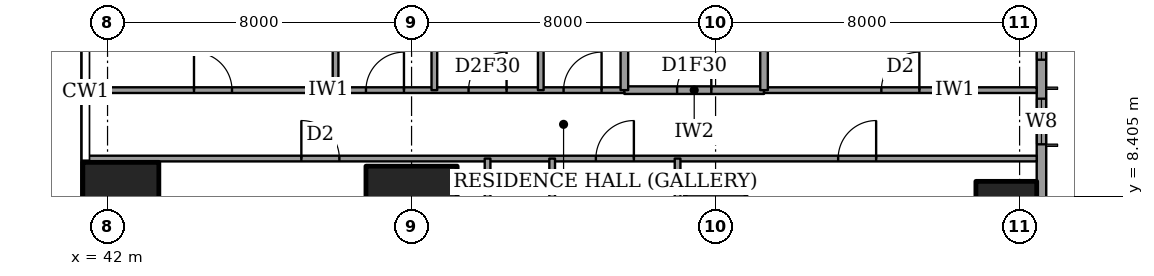
"""IFC4 building model, lengths in metres.
Left out: names, types, materials, properties, quantities, classifications, styles, units other than length and angle.
Written with IfcOpenShell. Run it as: python <this file> out.ifc"""

import sys

from ifc_helpers import new_model, si_unit, direction, frame, frame_2d, origin, origin_2d, place, context, subcontext, project, spatial, rectangle, extrude, element, fill, save


model = new_model("IFC4")
c1 = context("Model", 3, precision=1e-05, world=origin(), true_north=direction((0.0, 1.0)))
c2 = subcontext(c1, "Body", "Model", "MODEL_VIEW")
j1 = project(units=[si_unit("LENGTHUNIT", "METRE"), si_unit("PLANEANGLEUNIT", "RADIAN")], contexts=[c1])
p1 = place(None, origin())
s1 = spatial("IfcSite", under=j1, at=p1, CompositionType="ELEMENT")
p2 = place(p1, origin())
s2 = spatial("IfcBuilding", under=s1, at=p2, CompositionType="ELEMENT")
p3 = place(p2, frame((0.0, 0.0, 259.2)))
s3 = spatial("IfcBuildingStorey", under=s2, at=p3, CompositionType="ELEMENT", Elevation=259.2)
p4 = place(p3, frame((42.35, 8.0, 0.0), z_axis=(0.0, 0.0, 1.0), x_axis=(1.0, 0.0, 0.0)))
e1 = element("IfcColumn", 1, at=p4, inside=s3, PredefinedType="COLUMN", context=c2, shape_type="SweptSolid", body=[
    extrude(rectangle(XDim=2.0, YDim=2.6, at=origin_2d()), origin(), (0.0, 0.0, 1.0), 3.6),
])
p5 = place(p3, frame((50.0, 8.0, 0.0), z_axis=(0.0, 0.0, 1.0), x_axis=(1.0, 0.0, 0.0)))
e2 = element("IfcColumn", 2, at=p5, inside=s3, PredefinedType="COLUMN", context=c2, shape_type="SweptSolid", body=[
    extrude(rectangle(XDim=2.4, YDim=2.4, at=origin_2d()), origin(), (0.0, 0.0, 1.0), 3.6),
])
for number, where, z_axis, x_axis in (
    (3, (58.0, 8.0, 0.0), (0.0, 0.0, 1.0), (1.0, 0.0, 0.0)),
    (4, (65.65, 8.0, 0.0), (0.0, 0.0, 1.0), (1.0, 0.0, 0.0)),
):
    element("IfcColumn", number, at=place(p3, frame(where, z_axis=z_axis, x_axis=x_axis)), inside=s3, PredefinedType="COLUMN", context=c2, shape_type="SweptSolid", body=[
        extrude(rectangle(XDim=1.6, YDim=1.6, at=origin_2d()), origin(), (0.0, 0.0, 1.0), 3.6),
    ])
p6 = place(p3, frame((66.575, 3.175, 0.0), z_axis=(0.0, 0.0, 1.0), x_axis=(0.0, 1.0, 0.0)))
e5 = element("IfcWall", 5, at=p6, inside=s3, PredefinedType="SOLIDWALL", context=c2, shape_type="SweptSolid", body=[
    extrude(rectangle(XDim=41.65, YDim=0.25, at=frame_2d((20.825, 0.0))), origin(), (0.0, 0.0, 1.0), 3.6),
])
p7 = place(p6, frame((0.875, 0.0, 0.6)))
e6 = element("IfcOpeningElement", 6, at=p7, cuts=e5, PredefinedType="OPENING", context=c2, shape_type="SweptSolid", body=[
    extrude(rectangle(XDim=2.4, YDim=2.0, at=frame_2d((1.2, 1.0))), frame((0.0, 0.135, 0.0), z_axis=(0.0, -1.0, 0.0), x_axis=(1.0, 0.0, 0.0)), (0.0, 0.0, 1.0), 0.27),
])
p8 = place(p6, frame((6.6, 0.0, 0.6)))
e7 = element("IfcOpeningElement", 7, at=p8, cuts=e5, PredefinedType="OPENING", context=c2, shape_type="SweptSolid", body=[
    extrude(rectangle(XDim=1.2, YDim=2.0, at=frame_2d((0.6, 1.0))), frame((0.0, 0.135, 0.0), z_axis=(0.0, -1.0, 0.0), x_axis=(1.0, 0.0, 0.0)), (0.0, 0.0, 1.0), 0.27),
])
p9 = place(p6, frame((8.825, 0.0, 0.6)))
e8 = element("IfcOpeningElement", 8, at=p9, cuts=e5, PredefinedType="OPENING", context=c2, shape_type="SweptSolid", body=[
    extrude(rectangle(XDim=2.4, YDim=2.0, at=frame_2d((1.2, 1.0))), frame((0.0, 0.135, 0.0), z_axis=(0.0, -1.0, 0.0), x_axis=(1.0, 0.0, 0.0)), (0.0, 0.0, 1.0), 0.27),
])
p10 = place(p6, frame((15.725, 0.0, 0.6)))
e9 = element("IfcOpeningElement", 9, at=p10, cuts=e5, PredefinedType="OPENING", context=c2, shape_type="SweptSolid", body=[
    extrude(rectangle(XDim=2.4, YDim=2.0, at=frame_2d((1.2, 1.0))), frame((0.0, 0.135, 0.0), z_axis=(0.0, -1.0, 0.0), x_axis=(1.0, 0.0, 0.0)), (0.0, 0.0, 1.0), 0.27),
])
p11 = place(p6, frame((23.625, 0.0, 0.6)))
e10 = element("IfcOpeningElement", 10, at=p11, cuts=e5, PredefinedType="OPENING", context=c2, shape_type="SweptSolid", body=[
    extrude(rectangle(XDim=2.4, YDim=2.0, at=frame_2d((1.2, 1.0))), frame((0.0, 0.135, 0.0), z_axis=(0.0, -1.0, 0.0), x_axis=(1.0, 0.0, 0.0)), (0.0, 0.0, 1.0), 0.27),
])
p12 = place(p6, frame((30.725, 0.0, 0.6)))
e11 = element("IfcOpeningElement", 11, at=p12, cuts=e5, PredefinedType="OPENING", context=c2, shape_type="SweptSolid", body=[
    extrude(rectangle(XDim=2.4, YDim=2.0, at=frame_2d((1.2, 1.0))), frame((0.0, 0.135, 0.0), z_axis=(0.0, -1.0, 0.0), x_axis=(1.0, 0.0, 0.0)), (0.0, 0.0, 1.0), 0.27),
])
p13 = place(p6, frame((34.525, 0.0, 0.6)))
e12 = element("IfcOpeningElement", 12, at=p13, cuts=e5, PredefinedType="OPENING", context=c2, shape_type="SweptSolid", body=[
    extrude(rectangle(XDim=1.2, YDim=2.0, at=frame_2d((0.6, 1.0))), frame((0.0, 0.135, 0.0), z_axis=(0.0, -1.0, 0.0), x_axis=(1.0, 0.0, 0.0)), (0.0, 0.0, 1.0), 0.27),
])
p14 = place(p6, frame((38.375, 0.0, 0.6)))
e13 = element("IfcOpeningElement", 13, at=p14, cuts=e5, PredefinedType="OPENING", context=c2, shape_type="SweptSolid", body=[
    extrude(rectangle(XDim=2.4, YDim=2.0, at=frame_2d((1.2, 1.0))), frame((0.0, 0.135, 0.0), z_axis=(0.0, -1.0, 0.0), x_axis=(1.0, 0.0, 0.0)), (0.0, 0.0, 1.0), 0.27),
])
p15 = place(p3, frame((41.439, 9.4, 0.0), z_axis=(0.0, 0.0, 1.0), x_axis=(1.0, 0.0, 0.0)))
e14 = element("IfcWall", 14, at=p15, inside=s3, PredefinedType="PARTITIONING", context=c2, shape_type="SweptSolid", body=[
    extrude(rectangle(XDim=25.011, YDim=0.15, at=frame_2d((12.505, 0.0))), origin(), (0.0, 0.0, 1.0), 3.35),
])
p16 = place(p15, frame((19.786, 0.0, 0.0)))
e15 = element("IfcOpeningElement", 15, at=p16, cuts=e14, PredefinedType="OPENING", context=c2, shape_type="SweptSolid", body=[
    extrude(rectangle(XDim=1.0, YDim=2.1, at=frame_2d((0.5, 1.05))), frame((0.0, 0.085, 0.0), z_axis=(0.0, -1.0, 0.0), x_axis=(1.0, 0.0, 0.0)), (0.0, 0.0, 1.0), 0.17),
])
p17 = place(p15, frame((13.411, 0.0, 0.0)))
e16 = element("IfcOpeningElement", 16, at=p17, cuts=e14, PredefinedType="OPENING", context=c2, shape_type="SweptSolid", body=[
    extrude(rectangle(XDim=1.0, YDim=2.1, at=frame_2d((0.5, 1.05))), frame((0.0, 0.085, 0.0), z_axis=(0.0, -1.0, 0.0), x_axis=(1.0, 0.0, 0.0)), (0.0, 0.0, 1.0), 0.17),
])
p18 = place(p15, frame((5.661, 0.0, 0.0)))
e17 = element("IfcOpeningElement", 17, at=p18, cuts=e14, PredefinedType="OPENING", context=c2, shape_type="SweptSolid", body=[
    extrude(rectangle(XDim=1.0, YDim=2.1, at=frame_2d((0.5, 1.05))), frame((0.0, 0.085, 0.0), z_axis=(0.0, -1.0, 0.0), x_axis=(1.0, 0.0, 0.0)), (0.0, 0.0, 1.0), 0.17),
])
p19 = place(p3, frame((55.6, 11.2, 0.0), z_axis=(0.0, 0.0, 1.0), x_axis=(1.0, 0.0, 0.0)))
e18 = element("IfcWall", 18, at=p19, inside=s3, PredefinedType="PARTITIONING", context=c2, shape_type="SweptSolid", body=[
    extrude(rectangle(XDim=3.675, YDim=0.2, at=frame_2d((1.837, 0.0))), origin(), (0.0, 0.0, 1.0), 3.35),
])
p20 = place(p19, frame((1.387, 0.0, 0.0)))
e19 = element("IfcOpeningElement", 19, at=p20, cuts=e18, PredefinedType="OPENING", context=c2, shape_type="SweptSolid", body=[
    extrude(rectangle(XDim=0.9, YDim=2.1, at=frame_2d((0.45, 1.05))), frame((0.0, 0.11, 0.0), z_axis=(0.0, -1.0, 0.0), x_axis=(1.0, 0.0, 0.0)), (0.0, 0.0, 1.0), 0.22),
])
p21 = place(p3, frame((41.439, 11.2, 0.0), z_axis=(0.0, 0.0, 1.0), x_axis=(1.0, 0.0, 0.0)))
e20 = element("IfcWall", 20, at=p21, inside=s3, PredefinedType="PARTITIONING", context=c2, shape_type="SweptSolid", body=[
    extrude(rectangle(XDim=14.161, YDim=0.15, at=frame_2d((7.081, 0.0))), origin(), (0.0, 0.0, 1.0), 3.35),
])
p22 = place(p21, frame((12.561, 0.0, 0.0)))
e21 = element("IfcOpeningElement", 21, at=p22, cuts=e20, PredefinedType="OPENING", context=c2, shape_type="SweptSolid", body=[
    extrude(rectangle(XDim=1.0, YDim=2.1, at=frame_2d((0.5, 1.05))), frame((0.0, 0.085, 0.0), z_axis=(0.0, -1.0, 0.0), x_axis=(1.0, 0.0, 0.0)), (0.0, 0.0, 1.0), 0.17),
])
p23 = place(p21, frame((10.061, 0.0, 0.0)))
e22 = element("IfcOpeningElement", 22, at=p23, cuts=e20, PredefinedType="OPENING", context=c2, shape_type="SweptSolid", body=[
    extrude(rectangle(XDim=1.0, YDim=2.1, at=frame_2d((0.5, 1.05))), frame((0.0, 0.085, 0.0), z_axis=(0.0, -1.0, 0.0), x_axis=(1.0, 0.0, 0.0)), (0.0, 0.0, 1.0), 0.17),
])
p24 = place(p21, frame((7.361, 0.0, 0.0)))
e23 = element("IfcOpeningElement", 23, at=p24, cuts=e20, PredefinedType="OPENING", context=c2, shape_type="SweptSolid", body=[
    extrude(rectangle(XDim=1.0, YDim=2.1, at=frame_2d((0.5, 1.05))), frame((0.0, 0.085, 0.0), z_axis=(0.0, -1.0, 0.0), x_axis=(1.0, 0.0, 0.0)), (0.0, 0.0, 1.0), 0.17),
])
p25 = place(p21, frame((2.836, 0.0, 0.0)))
e24 = element("IfcOpeningElement", 24, at=p25, cuts=e20, PredefinedType="OPENING", context=c2, shape_type="SweptSolid", body=[
    extrude(rectangle(XDim=1.0, YDim=2.1, at=frame_2d((0.5, 1.05))), frame((0.0, 0.085, 0.0), z_axis=(0.0, -1.0, 0.0), x_axis=(1.0, 0.0, 0.0)), (0.0, 0.0, 1.0), 0.17),
])
p26 = place(p3, frame((59.275, 11.2, 0.0), z_axis=(0.0, 0.0, 1.0), x_axis=(1.0, 0.0, 0.0)))
e25 = element("IfcWall", 25, at=p26, inside=s3, PredefinedType="PARTITIONING", context=c2, shape_type="SweptSolid", body=[
    extrude(rectangle(XDim=7.175, YDim=0.15, at=frame_2d((3.587, 0.0))), origin(), (0.0, 0.0, 1.0), 3.35),
])
p27 = place(p26, frame((3.087, 0.0, 0.0)))
e26 = element("IfcOpeningElement", 26, at=p27, cuts=e25, PredefinedType="OPENING", context=c2, shape_type="SweptSolid", body=[
    extrude(rectangle(XDim=1.0, YDim=2.1, at=frame_2d((0.5, 1.05))), frame((0.0, 0.085, 0.0), z_axis=(0.0, -1.0, 0.0), x_axis=(1.0, 0.0, 0.0)), (0.0, 0.0, 1.0), 0.17),
])
p28 = place(p3, frame((48.0, 11.2, 0.0), z_axis=(0.0, 0.0, 1.0), x_axis=(0.0, 1.0, 0.0)))
e27 = element("IfcWall", 27, at=p28, inside=s3, PredefinedType="PARTITIONING", context=c2, shape_type="SweptSolid", body=[
    extrude(rectangle(XDim=6.8, YDim=0.15, at=frame_2d((3.4, 0.0))), origin(), (0.0, 0.0, 1.0), 3.35),
])
p29 = place(p3, frame((50.6, 11.2, 0.0), z_axis=(0.0, 0.0, 1.0), x_axis=(0.0, 1.0, 0.0)))
e28 = element("IfcWall", 28, at=p29, inside=s3, PredefinedType="PARTITIONING", context=c2, shape_type="SweptSolid", body=[
    extrude(rectangle(XDim=3.6, YDim=0.15, at=frame_2d((1.8, 0.0))), origin(), (0.0, 0.0, 1.0), 3.35),
])
p30 = place(p3, frame((52.0, -0.45, 0.0), z_axis=(0.0, 0.0, 1.0), x_axis=(0.0, 1.0, 0.0)))
e29 = element("IfcWall", 29, at=p30, inside=s3, PredefinedType="PARTITIONING", context=c2, shape_type="SweptSolid", body=[
    extrude(rectangle(XDim=9.85, YDim=0.15, at=frame_2d((4.925, 0.0))), origin(), (0.0, 0.0, 1.0), 3.35),
])
p31 = place(p3, frame((53.4, 11.2, 0.0), z_axis=(0.0, 0.0, 1.0), x_axis=(0.0, 1.0, 0.0)))
e30 = element("IfcWall", 30, at=p31, inside=s3, PredefinedType="PARTITIONING", context=c2, shape_type="SweptSolid", body=[
    extrude(rectangle(XDim=6.8, YDim=0.15, at=frame_2d((3.4, 0.0))), origin(), (0.0, 0.0, 1.0), 3.35),
])
p32 = place(p3, frame((53.7, -0.45, 0.0), z_axis=(0.0, 0.0, 1.0), x_axis=(0.0, 1.0, 0.0)))
e31 = element("IfcWall", 31, at=p32, inside=s3, PredefinedType="PARTITIONING", context=c2, shape_type="SweptSolid", body=[
    extrude(rectangle(XDim=9.85, YDim=0.15, at=frame_2d((4.925, 0.0))), origin(), (0.0, 0.0, 1.0), 3.35),
])
p33 = place(p32, frame((4.475, 0.0, 0.0)))
e32 = element("IfcOpeningElement", 32, at=p33, cuts=e31, PredefinedType="OPENING", context=c2, shape_type="SweptSolid", body=[
    extrude(rectangle(XDim=0.9, YDim=2.1, at=frame_2d((0.45, 1.05))), frame((0.0, 0.085, 0.0), z_axis=(0.0, -1.0, 0.0), x_axis=(1.0, 0.0, 0.0)), (0.0, 0.0, 1.0), 0.17),
])
p34 = place(p3, frame((55.6, 11.2, 0.0), z_axis=(0.0, 0.0, 1.0), x_axis=(0.0, 1.0, 0.0)))
e33 = element("IfcWall", 33, at=p34, inside=s3, PredefinedType="PARTITIONING", context=c2, shape_type="SweptSolid", body=[
    extrude(rectangle(XDim=3.4, YDim=0.2, at=frame_2d((1.7, 0.0))), origin(), (0.0, 0.0, 1.0), 3.35),
])
p35 = place(p3, frame((57.0, -0.45, 0.0), z_axis=(0.0, 0.0, 1.0), x_axis=(0.0, 1.0, 0.0)))
e34 = element("IfcWall", 34, at=p35, inside=s3, PredefinedType="PARTITIONING", context=c2, shape_type="SweptSolid", body=[
    extrude(rectangle(XDim=9.85, YDim=0.15, at=frame_2d((4.925, 0.0))), origin(), (0.0, 0.0, 1.0), 3.35),
])
p36 = place(p3, frame((59.275, 11.2, 0.0), z_axis=(0.0, 0.0, 1.0), x_axis=(0.0, 1.0, 0.0)))
e35 = element("IfcWall", 35, at=p36, inside=s3, PredefinedType="PARTITIONING", context=c2, shape_type="SweptSolid", body=[
    extrude(rectangle(XDim=3.4, YDim=0.2, at=frame_2d((1.7, 0.0))), origin(), (0.0, 0.0, 1.0), 3.35),
])
p37 = place(p8, origin())
e36 = element("IfcWindow", 36, at=p37, inside=s3, PartitioningType="SINGLE_PANEL", PredefinedType="WINDOW", context=c2, shape_type="SweptSolid", body=[
    extrude(rectangle(XDim=1.2, YDim=2.0, at=frame_2d((0.6, 1.0))), frame((0.0, 0.03, 0.0), z_axis=(0.0, -1.0, 0.0), x_axis=(1.0, 0.0, 0.0)), (0.0, 0.0, 1.0), 0.06),
])
fill(e7, e36)
p38 = place(p9, origin())
e37 = element("IfcWindow", 37, at=p38, inside=s3, PartitioningType="SINGLE_PANEL", PredefinedType="WINDOW", context=c2, shape_type="SweptSolid", body=[
    extrude(rectangle(XDim=2.4, YDim=2.0, at=frame_2d((1.2, 1.0))), frame((0.0, 0.03, 0.0), z_axis=(0.0, -1.0, 0.0), x_axis=(1.0, 0.0, 0.0)), (0.0, 0.0, 1.0), 0.06),
])
fill(e8, e37)
p39 = place(p16, origin())
e38 = element("IfcDoor", 38, at=p39, inside=s3, OperationType="SINGLE_SWING_LEFT", PredefinedType="DOOR", context=c2, shape_type="SweptSolid", body=[
    extrude(rectangle(XDim=1.0, YDim=2.1, at=frame_2d((0.5, 1.05))), frame((0.0, 0.025, 0.0), z_axis=(0.0, -1.0, 0.0), x_axis=(1.0, 0.0, 0.0)), (0.0, 0.0, 1.0), 0.05),
])
fill(e15, e38)
p40 = place(p17, origin())
e39 = element("IfcDoor", 39, at=p40, inside=s3, OperationType="SINGLE_SWING_LEFT", PredefinedType="DOOR", context=c2, shape_type="SweptSolid", body=[
    extrude(rectangle(XDim=1.0, YDim=2.1, at=frame_2d((0.5, 1.05))), frame((0.0, 0.025, 0.0), z_axis=(0.0, -1.0, 0.0), x_axis=(1.0, 0.0, 0.0)), (0.0, 0.0, 1.0), 0.05),
])
fill(e16, e39)
p41 = place(p18, origin())
e40 = element("IfcDoor", 40, at=p41, inside=s3, OperationType="SINGLE_SWING_RIGHT", PredefinedType="DOOR", context=c2, shape_type="SweptSolid", body=[
    extrude(rectangle(XDim=1.0, YDim=2.1, at=frame_2d((0.5, 1.05))), frame((0.0, 0.025, 0.0), z_axis=(0.0, -1.0, 0.0), x_axis=(1.0, 0.0, 0.0)), (0.0, 0.0, 1.0), 0.05),
])
fill(e17, e40)
p42 = place(p22, origin())
e41 = element("IfcDoor", 41, at=p42, inside=s3, OperationType="SINGLE_SWING_LEFT", PredefinedType="DOOR", context=c2, shape_type="SweptSolid", body=[
    extrude(rectangle(XDim=1.0, YDim=2.1, at=frame_2d((0.5, 1.05))), frame((0.0, 0.025, 0.0), z_axis=(0.0, -1.0, 0.0), x_axis=(1.0, 0.0, 0.0)), (0.0, 0.0, 1.0), 0.05),
])
fill(e21, e41)
p43 = place(p27, origin())
e42 = element("IfcDoor", 42, at=p43, inside=s3, OperationType="SINGLE_SWING_LEFT", PredefinedType="DOOR", context=c2, shape_type="SweptSolid", body=[
    extrude(rectangle(XDim=1.0, YDim=2.1, at=frame_2d((0.5, 1.05))), frame((0.0, 0.025, 0.0), z_axis=(0.0, -1.0, 0.0), x_axis=(1.0, 0.0, 0.0)), (0.0, 0.0, 1.0), 0.05),
])
fill(e26, e42)
p44 = place(p20, origin())
e43 = element("IfcDoor", 43, at=p44, inside=s3, OperationType="SINGLE_SWING_LEFT", PredefinedType="DOOR", context=c2, shape_type="SweptSolid", body=[
    extrude(rectangle(XDim=0.9, YDim=2.1, at=frame_2d((0.45, 1.05))), frame((0.0, 0.025, 0.0), z_axis=(0.0, -1.0, 0.0), x_axis=(1.0, 0.0, 0.0)), (0.0, 0.0, 1.0), 0.05),
])
fill(e19, e43)
p45 = place(p23, origin())
e44 = element("IfcDoor", 44, at=p45, inside=s3, OperationType="SINGLE_SWING_LEFT", PredefinedType="DOOR", context=c2, shape_type="SweptSolid", body=[
    extrude(rectangle(XDim=1.0, YDim=2.1, at=frame_2d((0.5, 1.05))), frame((0.0, 0.025, 0.0), z_axis=(0.0, -1.0, 0.0), x_axis=(1.0, 0.0, 0.0)), (0.0, 0.0, 1.0), 0.05),
])
fill(e22, e44)
p46 = place(p24, origin())
e45 = element("IfcDoor", 45, at=p46, inside=s3, OperationType="SINGLE_SWING_LEFT", PredefinedType="DOOR", context=c2, shape_type="SweptSolid", body=[
    extrude(rectangle(XDim=1.0, YDim=2.1, at=frame_2d((0.5, 1.05))), frame((0.0, 0.025, 0.0), z_axis=(0.0, -1.0, 0.0), x_axis=(1.0, 0.0, 0.0)), (0.0, 0.0, 1.0), 0.05),
])
fill(e23, e45)
p47 = place(p25, origin())
e46 = element("IfcDoor", 46, at=p47, inside=s3, OperationType="SINGLE_SWING_RIGHT", PredefinedType="DOOR", context=c2, shape_type="SweptSolid", body=[
    extrude(rectangle(XDim=1.0, YDim=2.1, at=frame_2d((0.5, 1.05))), frame((0.0, 0.025, 0.0), z_axis=(0.0, -1.0, 0.0), x_axis=(1.0, 0.0, 0.0)), (0.0, 0.0, 1.0), 0.05),
])
fill(e24, e46)
save(model, sys.argv[1])
